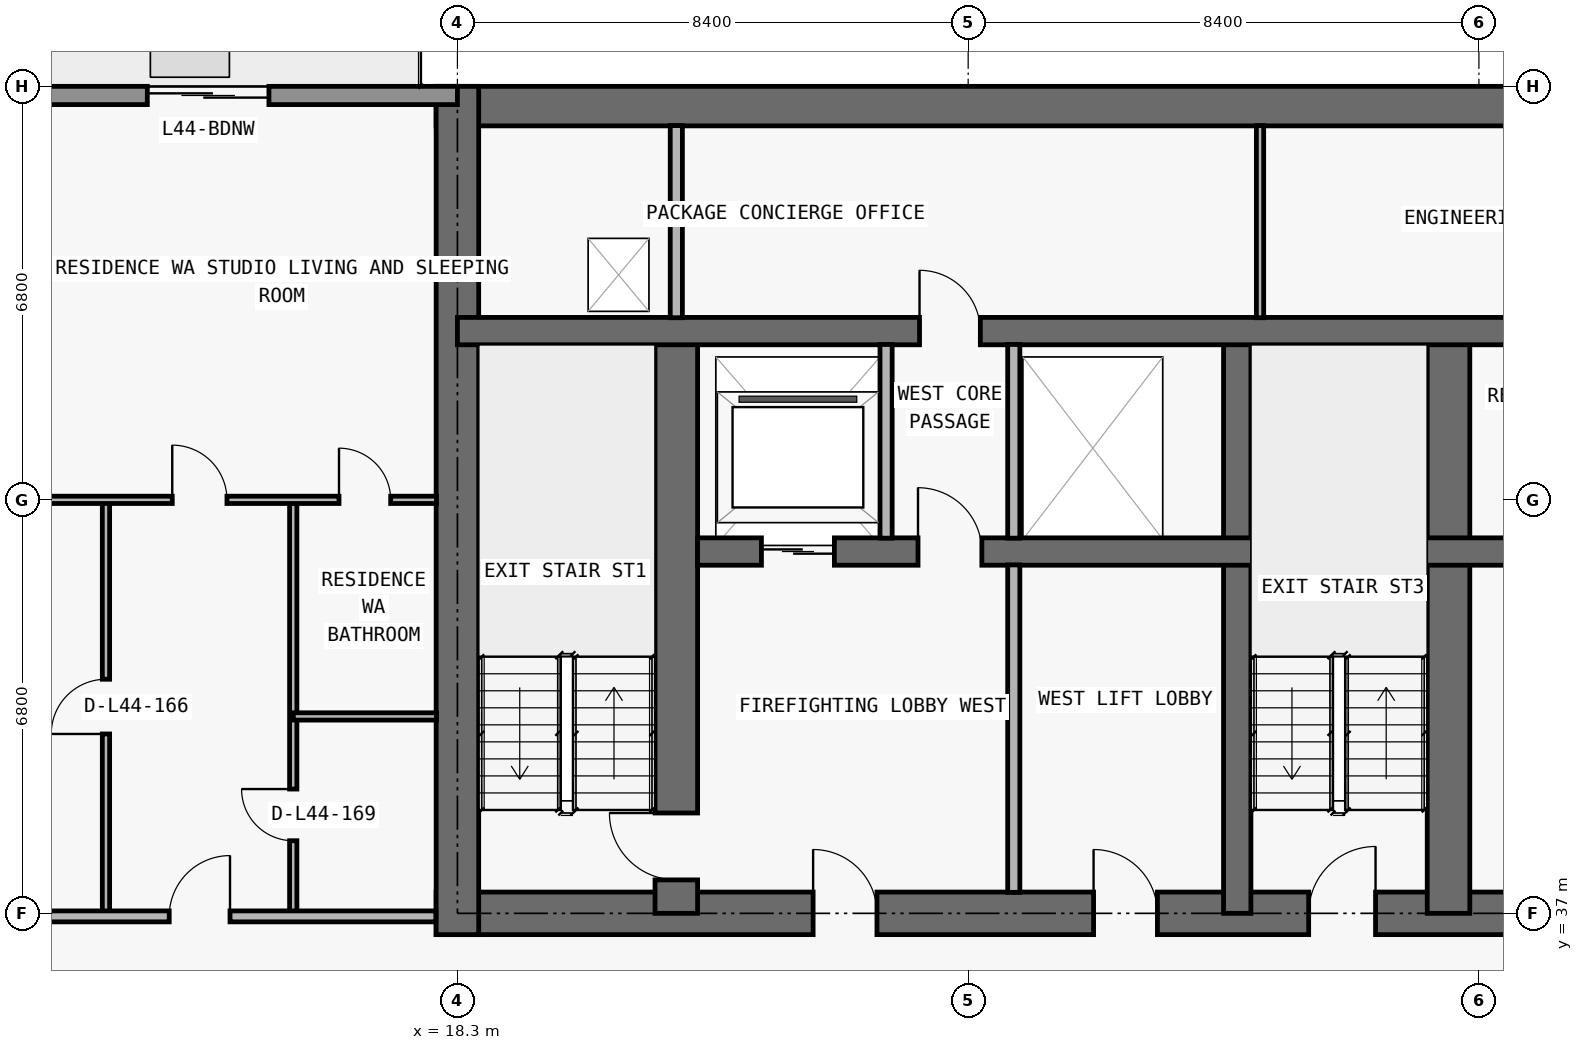
"""IFC4 building model, lengths in metres.
Left out: names, types, materials, properties, quantities, classifications, styles, units other than length and angle.
Written with IfcOpenShell. Run it as: python <this file> out.ifc"""

import sys

from ifc_helpers import new_model, si_unit, direction, frame, frame_2d, origin, place, context, subcontext, project, spatial, rectangle, extrude, element, fill, save


model = new_model("IFC4")
c1 = context("Model", 3, precision=1e-05, world=origin(), true_north=direction((0.0, 1.0)))
c2 = subcontext(c1, "Body", "Model", "MODEL_VIEW")
j1 = project(units=[si_unit("LENGTHUNIT", "METRE"), si_unit("PLANEANGLEUNIT", "RADIAN")], contexts=[c1])
p1 = place(None, origin())
s1 = spatial("IfcSite", under=j1, at=p1, CompositionType="ELEMENT")
p2 = place(p1, origin())
s2 = spatial("IfcBuilding", under=s1, at=p2, CompositionType="ELEMENT")
p3 = place(p2, frame((0.0, 0.0, 160.5)))
s3 = spatial("IfcBuildingStorey", under=s2, at=p3, CompositionType="ELEMENT", Elevation=160.5)
p4 = place(p3, frame((17.95, 37.0, 0.0), z_axis=(0.0, 0.0, 1.0), x_axis=(1.0, 0.0, 0.0)))
e1 = element("IfcWall", 1, at=p4, inside=s3, PredefinedType="SHEAR", context=c2, shape_type="SweptSolid", body=[
    extrude(rectangle(XDim=41.9, YDim=0.7, at=frame_2d((20.95, 0.0))), origin(), (0.0, 0.0, 1.0), 3.05),
])
p5 = place(p4, frame((14.35, 0.0, 0.0)))
e2 = element("IfcOpeningElement", 2, at=p5, cuts=e1, PredefinedType="OPENING", context=c2, shape_type="SweptSolid", body=[
    extrude(rectangle(XDim=1.1, YDim=2.15, at=frame_2d((0.55, 1.075))), frame((0.0, 0.36, 0.0), z_axis=(0.0, -1.0, 0.0), x_axis=(1.0, 0.0, 0.0)), (0.0, 0.0, 1.0), 0.72),
])
p6 = place(p4, frame((6.2, 0.0, 0.0)))
e3 = element("IfcOpeningElement", 3, at=p6, cuts=e1, PredefinedType="OPENING", context=c2, shape_type="SweptSolid", body=[
    extrude(rectangle(XDim=1.05, YDim=2.15, at=frame_2d((0.525, 1.075))), frame((0.0, 0.36, 0.0), z_axis=(0.0, -1.0, 0.0), x_axis=(1.0, 0.0, 0.0)), (0.0, 0.0, 1.0), 0.72),
])
p7 = place(p4, frame((34.7, 0.0, 0.0)))
e4 = element("IfcOpeningElement", 4, at=p7, cuts=e1, PredefinedType="OPENING", context=c2, shape_type="SweptSolid", body=[
    extrude(rectangle(XDim=1.05, YDim=2.15, at=frame_2d((0.525, 1.075))), frame((0.0, 0.36, 0.0), z_axis=(0.0, -1.0, 0.0), x_axis=(1.0, 0.0, 0.0)), (0.0, 0.0, 1.0), 0.72),
])
p8 = place(p4, frame((10.812, 0.0, 0.0)))
e5 = element("IfcOpeningElement", 5, at=p8, cuts=e1, PredefinedType="OPENING", context=c2, shape_type="SweptSolid", body=[
    extrude(rectangle(XDim=1.05, YDim=2.15, at=frame_2d((0.525, 1.075))), frame((0.0, 0.36, 0.0), z_axis=(0.0, -1.0, 0.0), x_axis=(1.0, 0.0, 0.0)), (0.0, 0.0, 1.0), 0.72),
])
p9 = place(p4, frame((24.05, 0.0, 0.0)))
e6 = element("IfcOpeningElement", 6, at=p9, cuts=e1, PredefinedType="OPENING", context=c2, shape_type="SweptSolid", body=[
    extrude(rectangle(XDim=1.05, YDim=2.15, at=frame_2d((0.525, 1.075))), frame((0.0, 0.36, 0.0), z_axis=(0.0, -1.0, 0.0), x_axis=(1.0, 0.0, 0.0)), (0.0, 0.0, 1.0), 0.72),
])
p10 = place(p3, frame((17.95, 50.275, 0.0), z_axis=(0.0, 0.0, 1.0), x_axis=(1.0, 0.0, 0.0)))
e7 = element("IfcWall", 7, at=p10, inside=s3, PredefinedType="SHEAR", context=c2, shape_type="SweptSolid", body=[
    extrude(rectangle(XDim=41.9, YDim=0.65, at=frame_2d((20.95, 0.0))), origin(), (0.0, 0.0, 1.0), 3.05),
])
p11 = place(p3, frame((18.3, 36.65, 0.0), z_axis=(0.0, 0.0, 1.0), x_axis=(0.0, 1.0, 0.0)))
e8 = element("IfcWall", 8, at=p11, inside=s3, PredefinedType="SHEAR", context=c2, shape_type="SweptSolid", body=[
    extrude(rectangle(XDim=13.95, YDim=0.7, at=frame_2d((6.975, 0.0))), origin(), (0.0, 0.0, 1.0), 3.05),
])
p12 = place(p3, frame((21.9, 37.0, 0.0), z_axis=(0.0, 0.0, 1.0), x_axis=(0.0, 1.0, 0.0)))
e9 = element("IfcWall", 9, at=p12, inside=s3, PredefinedType="SHEAR", context=c2, shape_type="SweptSolid", body=[
    extrude(rectangle(XDim=9.575, YDim=0.7, at=frame_2d((4.788, 0.0))), origin(), (0.0, 0.0, 1.0), 3.05),
])
p13 = place(p12, frame((0.55, 0.0, 0.0)))
e10 = element("IfcOpeningElement", 10, at=p13, cuts=e9, PredefinedType="OPENING", context=c2, shape_type="SweptSolid", body=[
    extrude(rectangle(XDim=1.1, YDim=2.15, at=frame_2d((0.55, 1.075))), frame((0.0, 0.36, 0.0), z_axis=(0.0, -1.0, 0.0), x_axis=(1.0, 0.0, 0.0)), (0.0, 0.0, 1.0), 0.72),
])
p14 = place(p3, frame((31.125, 37.0, 0.0), z_axis=(0.0, 0.0, 1.0), x_axis=(0.0, 1.0, 0.0)))
e11 = element("IfcWall", 11, at=p14, inside=s3, PredefinedType="SHEAR", context=c2, shape_type="SweptSolid", body=[
    extrude(rectangle(XDim=9.575, YDim=0.45, at=frame_2d((4.788, 0.0))), origin(), (0.0, 0.0, 1.0), 3.05),
])
p15 = place(p3, frame((34.6, 37.0, 0.0), z_axis=(0.0, 0.0, 1.0), x_axis=(0.0, 1.0, 0.0)))
e12 = element("IfcWall", 12, at=p15, inside=s3, PredefinedType="SHEAR", context=c2, shape_type="SweptSolid", body=[
    extrude(rectangle(XDim=9.575, YDim=0.7, at=frame_2d((4.788, 0.0))), origin(), (0.0, 0.0, 1.0), 3.05),
])
p16 = place(p3, frame((22.25, 42.95, 0.0), z_axis=(0.0, 0.0, 1.0), x_axis=(1.0, 0.0, 0.0)))
e13 = element("IfcWall", 13, at=p16, inside=s3, PredefinedType="SHEAR", context=c2, shape_type="SweptSolid", body=[
    extrude(rectangle(XDim=33.3, YDim=0.45, at=frame_2d((16.65, 0.0))), origin(), (0.0, 0.0, 1.0), 3.05),
])
p17 = place(p16, frame((1.05, 0.0, 0.0)))
e14 = element("IfcOpeningElement", 14, at=p17, cuts=e13, PredefinedType="OPENING", context=c2, shape_type="SweptSolid", body=[
    extrude(rectangle(XDim=1.2, YDim=2.2, at=frame_2d((0.6, 1.1))), frame((0.0, 0.235, 0.0), z_axis=(0.0, -1.0, 0.0), x_axis=(1.0, 0.0, 0.0)), (0.0, 0.0, 1.0), 0.47),
])
p18 = place(p16, frame((31.05, 0.0, 0.0)))
e15 = element("IfcOpeningElement", 15, at=p18, cuts=e13, PredefinedType="OPENING", context=c2, shape_type="SweptSolid", body=[
    extrude(rectangle(XDim=1.2, YDim=2.2, at=frame_2d((0.6, 1.1))), frame((0.0, 0.235, 0.0), z_axis=(0.0, -1.0, 0.0), x_axis=(1.0, 0.0, 0.0)), (0.0, 0.0, 1.0), 0.47),
])
p19 = place(p16, frame((21.4, 0.0, 0.0)))
e16 = element("IfcOpeningElement", 16, at=p19, cuts=e13, PredefinedType="OPENING", context=c2, shape_type="SweptSolid", body=[
    extrude(rectangle(XDim=1.1, YDim=2.2, at=frame_2d((0.55, 1.1))), frame((0.0, 0.235, 0.0), z_axis=(0.0, -1.0, 0.0), x_axis=(1.0, 0.0, 0.0)), (0.0, 0.0, 1.0), 0.47),
])
p20 = place(p16, frame((24.0, 0.0, 0.0)))
e17 = element("IfcOpeningElement", 17, at=p20, cuts=e13, PredefinedType="OPENING", context=c2, shape_type="SweptSolid", body=[
    extrude(rectangle(XDim=1.1, YDim=2.2, at=frame_2d((0.55, 1.1))), frame((0.0, 0.235, 0.0), z_axis=(0.0, -1.0, 0.0), x_axis=(1.0, 0.0, 0.0)), (0.0, 0.0, 1.0), 0.47),
])
p21 = place(p16, frame((3.625, 0.0, 0.0)))
e18 = element("IfcOpeningElement", 18, at=p21, cuts=e13, PredefinedType="OPENING", context=c2, shape_type="SweptSolid", body=[
    extrude(rectangle(XDim=1.05, YDim=2.15, at=frame_2d((0.525, 1.075))), frame((0.0, 0.235, 0.0), z_axis=(0.0, -1.0, 0.0), x_axis=(1.0, 0.0, 0.0)), (0.0, 0.0, 1.0), 0.47),
])
p22 = place(p16, frame((28.675, 0.0, 0.0)))
e19 = element("IfcOpeningElement", 19, at=p22, cuts=e13, PredefinedType="OPENING", context=c2, shape_type="SweptSolid", body=[
    extrude(rectangle(XDim=1.05, YDim=2.15, at=frame_2d((0.525, 1.075))), frame((0.0, 0.235, 0.0), z_axis=(0.0, -1.0, 0.0), x_axis=(1.0, 0.0, 0.0)), (0.0, 0.0, 1.0), 0.47),
])
p23 = place(p16, frame((13.925, 0.0, 0.0)))
e20 = element("IfcOpeningElement", 20, at=p23, cuts=e13, PredefinedType="OPENING", context=c2, shape_type="SweptSolid", body=[
    extrude(rectangle(XDim=1.0, YDim=2.2, at=frame_2d((0.5, 1.1))), frame((0.0, 0.235, 0.0), z_axis=(0.0, -1.0, 0.0), x_axis=(1.0, 0.0, 0.0)), (0.0, 0.0, 1.0), 0.47),
])
p24 = place(p16, frame((18.05, 0.0, 0.0)))
e21 = element("IfcOpeningElement", 21, at=p24, cuts=e13, PredefinedType="OPENING", context=c2, shape_type="SweptSolid", body=[
    extrude(rectangle(XDim=1.0, YDim=2.2, at=frame_2d((0.5, 1.1))), frame((0.0, 0.235, 0.0), z_axis=(0.0, -1.0, 0.0), x_axis=(1.0, 0.0, 0.0)), (0.0, 0.0, 1.0), 0.47),
])
p25 = place(p3, frame((18.3, 46.575, 0.0), z_axis=(0.0, 0.0, 1.0), x_axis=(1.0, 0.0, 0.0)))
e22 = element("IfcWall", 22, at=p25, inside=s3, PredefinedType="SHEAR", context=c2, shape_type="SweptSolid", body=[
    extrude(rectangle(XDim=41.2, YDim=0.45, at=frame_2d((20.6, 0.0))), origin(), (0.0, 0.0, 1.0), 3.05),
])
p26 = place(p25, frame((7.6, 0.0, 0.0)))
e23 = element("IfcOpeningElement", 23, at=p26, cuts=e22, PredefinedType="OPENING", context=c2, shape_type="SweptSolid", body=[
    extrude(rectangle(XDim=1.0, YDim=2.2, at=frame_2d((0.5, 1.1))), frame((0.0, 0.235, 0.0), z_axis=(0.0, -1.0, 0.0), x_axis=(1.0, 0.0, 0.0)), (0.0, 0.0, 1.0), 0.47),
])
p27 = place(p25, frame((32.625, 0.0, 0.0)))
e24 = element("IfcOpeningElement", 24, at=p27, cuts=e22, PredefinedType="OPENING", context=c2, shape_type="SweptSolid", body=[
    extrude(rectangle(XDim=1.05, YDim=2.15, at=frame_2d((0.525, 1.075))), frame((0.0, 0.235, 0.0), z_axis=(0.0, -1.0, 0.0), x_axis=(1.0, 0.0, 0.0)), (0.0, 0.0, 1.0), 0.47),
])
p28 = place(p3, frame((10.1, 50.45, 0.0), z_axis=(0.0, 0.0, 1.0), x_axis=(1.0, 0.0, 0.0)))
e25 = element("IfcWall", 25, at=p28, inside=s3, PredefinedType="STANDARD", context=c2, shape_type="SweptSolid", body=[
    extrude(rectangle(XDim=8.2, YDim=0.3, at=frame_2d((4.1, 0.0))), origin(), (0.0, 0.0, 1.0), 3.05),
])
p29 = place(p28, frame((3.1, 0.0, 0.0)))
e26 = element("IfcOpeningElement", 26, at=p29, cuts=e25, PredefinedType="OPENING", context=c2, shape_type="SweptSolid", body=[
    extrude(rectangle(XDim=2.0, YDim=2.3, at=frame_2d((1.0, 1.15))), frame((0.0, 0.16, 0.0), z_axis=(0.0, -1.0, 0.0), x_axis=(1.0, 0.0, 0.0)), (0.0, 0.0, 1.0), 0.32),
])
p30 = place(p3, frame((12.52, 37.0, 0.0), z_axis=(0.0, 0.0, 1.0), x_axis=(0.0, 1.0, 0.0)))
e27 = element("IfcWall", 27, at=p30, inside=s3, PredefinedType="PARTITIONING", context=c2, shape_type="SweptSolid", body=[
    extrude(rectangle(XDim=6.8, YDim=0.12, at=frame_2d((3.4, 0.0))), origin(), (0.0, 0.0, 1.0), 2.578),
])
p31 = place(p30, frame((2.95, 0.0, 0.0)))
e28 = element("IfcOpeningElement", 28, at=p31, cuts=e27, PredefinedType="OPENING", context=c2, shape_type="SweptSolid", body=[
    extrude(rectangle(XDim=0.9, YDim=2.15, at=frame_2d((0.45, 1.075))), frame((0.0, 0.07, 0.0), z_axis=(0.0, -1.0, 0.0), x_axis=(1.0, 0.0, 0.0)), (0.0, 0.0, 1.0), 0.14),
])
p32 = place(p3, frame((15.6, 37.0, 0.0), z_axis=(0.0, 0.0, 1.0), x_axis=(0.0, 1.0, 0.0)))
e29 = element("IfcWall", 29, at=p32, inside=s3, PredefinedType="PARTITIONING", context=c2, shape_type="SweptSolid", body=[
    extrude(rectangle(XDim=6.8, YDim=0.12, at=frame_2d((3.4, 0.0))), origin(), (0.0, 0.0, 1.0), 2.679),
])
p33 = place(p32, frame((1.194, 0.0, 0.0)))
e30 = element("IfcOpeningElement", 30, at=p33, cuts=e29, PredefinedType="OPENING", context=c2, shape_type="SweptSolid", body=[
    extrude(rectangle(XDim=0.85, YDim=2.1, at=frame_2d((0.425, 1.05))), frame((0.0, 0.07, 0.0), z_axis=(0.0, -1.0, 0.0), x_axis=(1.0, 0.0, 0.0)), (0.0, 0.0, 1.0), 0.14),
])
p34 = place(p3, frame((21.9, 46.795, 0.0), z_axis=(0.0, 0.0, 1.0), x_axis=(0.0, 1.0, 0.0)))
e31 = element("IfcWall", 31, at=p34, inside=s3, PredefinedType="PARTITIONING", context=c2, shape_type="SweptSolid", body=[
    extrude(rectangle(XDim=3.16, YDim=0.2, at=frame_2d((1.58, 0.0))), origin(), (0.0, 0.0, 1.0), 3.05),
])
p35 = place(p3, frame((25.35, 43.17, 0.0), z_axis=(0.0, 0.0, 1.0), x_axis=(0.0, 1.0, 0.0)))
e32 = element("IfcWall", 32, at=p35, inside=s3, PredefinedType="PARTITIONING", context=c2, shape_type="SweptSolid", body=[
    extrude(rectangle(XDim=3.185, YDim=0.2, at=frame_2d((1.593, 0.0))), origin(), (0.0, 0.0, 1.0), 3.05),
])
p36 = place(p3, frame((27.45, 37.345, 0.0), z_axis=(0.0, 0.0, 1.0), x_axis=(0.0, 1.0, 0.0)))
e33 = element("IfcWall", 33, at=p36, inside=s3, PredefinedType="PARTITIONING", context=c2, shape_type="SweptSolid", body=[
    extrude(rectangle(XDim=5.385, YDim=0.2, at=frame_2d((2.692, 0.0))), origin(), (0.0, 0.0, 1.0), 3.05),
])
p37 = place(p3, frame((27.45, 43.17, 0.0), z_axis=(0.0, 0.0, 1.0), x_axis=(0.0, 1.0, 0.0)))
e34 = element("IfcWall", 34, at=p37, inside=s3, PredefinedType="PARTITIONING", context=c2, shape_type="SweptSolid", body=[
    extrude(rectangle(XDim=3.185, YDim=0.2, at=frame_2d((1.593, 0.0))), origin(), (0.0, 0.0, 1.0), 3.05),
])
p38 = place(p3, frame((31.5, 46.795, 0.0), z_axis=(0.0, 0.0, 1.0), x_axis=(0.0, 1.0, 0.0)))
e35 = element("IfcWall", 35, at=p38, inside=s3, PredefinedType="PARTITIONING", context=c2, shape_type="SweptSolid", body=[
    extrude(rectangle(XDim=3.16, YDim=0.12, at=frame_2d((1.58, 0.0))), origin(), (0.0, 0.0, 1.0), 3.05),
])
p39 = place(p3, frame((10.1, 36.95, 0.0), z_axis=(0.0, 0.0, 1.0), x_axis=(1.0, 0.0, 0.0)))
e36 = element("IfcWall", 36, at=p39, inside=s3, PredefinedType="PARTITIONING", context=c2, shape_type="SweptSolid", body=[
    extrude(rectangle(XDim=7.845, YDim=0.18, at=frame_2d((3.922, 0.0))), origin(), (0.0, 0.0, 1.0), 3.05),
])
p40 = place(p39, frame((3.46, 0.0, 0.0)))
e37 = element("IfcOpeningElement", 37, at=p40, cuts=e36, PredefinedType="OPENING", context=c2, shape_type="SweptSolid", body=[
    extrude(rectangle(XDim=1.0, YDim=2.2, at=frame_2d((0.5, 1.1))), frame((0.0, 0.1, 0.0), z_axis=(0.0, -1.0, 0.0), x_axis=(1.0, 0.0, 0.0)), (0.0, 0.0, 1.0), 0.2),
])
p41 = place(p3, frame((15.6, 40.238, 0.0), z_axis=(0.0, 0.0, 1.0), x_axis=(1.0, 0.0, 0.0)))
e38 = element("IfcWall", 38, at=p41, inside=s3, PredefinedType="PARTITIONING", context=c2, shape_type="SweptSolid", body=[
    extrude(rectangle(XDim=2.355, YDim=0.12, at=frame_2d((1.177, 0.0))), origin(), (0.0, 0.0, 1.0), 3.05),
])
p42 = place(p3, frame((6.395, 43.8, 0.0), z_axis=(0.0, 0.0, 1.0), x_axis=(1.0, 0.0, 0.0)))
e39 = element("IfcWall", 39, at=p42, inside=s3, PredefinedType="PARTITIONING", context=c2, shape_type="SweptSolid", body=[
    extrude(rectangle(XDim=11.56, YDim=0.12, at=frame_2d((5.78, 0.0))), origin(), (0.0, 0.0, 1.0), 2.418),
])
p43 = place(p42, frame((7.215, 0.0, 0.0)))
e40 = element("IfcOpeningElement", 40, at=p43, cuts=e39, PredefinedType="OPENING", context=c2, shape_type="SweptSolid", body=[
    extrude(rectangle(XDim=0.9, YDim=2.15, at=frame_2d((0.45, 1.075))), frame((0.0, 0.07, 0.0), z_axis=(0.0, -1.0, 0.0), x_axis=(1.0, 0.0, 0.0)), (0.0, 0.0, 1.0), 0.14),
])
p44 = place(p42, frame((9.958, 0.0, 0.0)))
e41 = element("IfcOpeningElement", 41, at=p44, cuts=e39, PredefinedType="OPENING", context=c2, shape_type="SweptSolid", body=[
    extrude(rectangle(XDim=0.85, YDim=2.1, at=frame_2d((0.425, 1.05))), frame((0.0, 0.07, 0.0), z_axis=(0.0, -1.0, 0.0), x_axis=(1.0, 0.0, 0.0)), (0.0, 0.0, 1.0), 0.14),
])
p45 = place(p29, origin())
e42 = element("IfcDoor", 42, at=p45, inside=s3, OperationType="DOUBLE_DOOR_SLIDING", PredefinedType="DOOR", context=c2, shape_type="SweptSolid", body=[
    extrude(rectangle(XDim=2.0, YDim=2.3, at=frame_2d((1.0, 1.15))), frame((0.0, 0.025, 0.0), z_axis=(0.0, -1.0, 0.0), x_axis=(1.0, 0.0, 0.0)), (0.0, 0.0, 1.0), 0.05),
])
fill(e26, e42)
p46 = place(p17, origin())
e43 = element("IfcDoor", 43, at=p46, inside=s3, OperationType="DOUBLE_DOOR_SLIDING", PredefinedType="DOOR", context=c2, shape_type="SweptSolid", body=[
    extrude(rectangle(XDim=1.2, YDim=2.2, at=frame_2d((0.6, 1.1))), frame((0.0, 0.025, 0.0), z_axis=(0.0, -1.0, 0.0), x_axis=(1.0, 0.0, 0.0)), (0.0, 0.0, 1.0), 0.05),
])
fill(e14, e43)
p47 = place(p5, origin())
e44 = element("IfcDoor", 44, at=p47, inside=s3, OperationType="SINGLE_SWING_RIGHT", PredefinedType="DOOR", context=c2, shape_type="SweptSolid", body=[
    extrude(rectangle(XDim=1.1, YDim=2.15, at=frame_2d((0.55, 1.075))), frame((0.0, 0.025, 0.0), z_axis=(0.0, -1.0, 0.0), x_axis=(1.0, 0.0, 0.0)), (0.0, 0.0, 1.0), 0.05),
])
fill(e2, e44)
p48 = place(p6, origin())
e45 = element("IfcDoor", 45, at=p48, inside=s3, OperationType="SINGLE_SWING_LEFT", PredefinedType="DOOR", context=c2, shape_type="SweptSolid", body=[
    extrude(rectangle(XDim=1.05, YDim=2.15, at=frame_2d((0.525, 1.075))), frame((0.0, 0.025, 0.0), z_axis=(0.0, -1.0, 0.0), x_axis=(1.0, 0.0, 0.0)), (0.0, 0.0, 1.0), 0.05),
])
fill(e3, e45)
p49 = place(p13, origin())
e46 = element("IfcDoor", 46, at=p49, inside=s3, OperationType="SINGLE_SWING_RIGHT", PredefinedType="DOOR", context=c2, shape_type="SweptSolid", body=[
    extrude(rectangle(XDim=1.1, YDim=2.15, at=frame_2d((0.55, 1.075))), frame((0.0, 0.025, 0.0), z_axis=(0.0, -1.0, 0.0), x_axis=(1.0, 0.0, 0.0)), (0.0, 0.0, 1.0), 0.05),
])
fill(e10, e46)
p50 = place(p21, origin())
e47 = element("IfcDoor", 47, at=p50, inside=s3, OperationType="SINGLE_SWING_LEFT", PredefinedType="DOOR", context=c2, shape_type="SweptSolid", body=[
    extrude(rectangle(XDim=1.05, YDim=2.15, at=frame_2d((0.525, 1.075))), frame((0.0, 0.025, 0.0), z_axis=(0.0, -1.0, 0.0), x_axis=(1.0, 0.0, 0.0)), (0.0, 0.0, 1.0), 0.05),
])
fill(e18, e47)
p51 = place(p8, origin())
e48 = element("IfcDoor", 48, at=p51, inside=s3, OperationType="SINGLE_SWING_LEFT", PredefinedType="DOOR", context=c2, shape_type="SweptSolid", body=[
    extrude(rectangle(XDim=1.05, YDim=2.15, at=frame_2d((0.525, 1.075))), frame((0.0, 0.025, 0.0), z_axis=(0.0, -1.0, 0.0), x_axis=(1.0, 0.0, 0.0)), (0.0, 0.0, 1.0), 0.05),
])
fill(e5, e48)
p52 = place(p26, origin())
e49 = element("IfcDoor", 49, at=p52, inside=s3, OperationType="SINGLE_SWING_LEFT", PredefinedType="DOOR", context=c2, shape_type="SweptSolid", body=[
    extrude(rectangle(XDim=1.0, YDim=2.2, at=frame_2d((0.5, 1.1))), frame((0.0, 0.025, 0.0), z_axis=(0.0, -1.0, 0.0), x_axis=(1.0, 0.0, 0.0)), (0.0, 0.0, 1.0), 0.05),
])
fill(e23, e49)
p53 = place(p31, origin())
e50 = element("IfcDoor", 50, at=p53, inside=s3, OperationType="SINGLE_SWING_LEFT", PredefinedType="DOOR", context=c2, shape_type="SweptSolid", body=[
    extrude(rectangle(XDim=0.9, YDim=2.15, at=frame_2d((0.45, 1.075))), frame((0.0, 0.025, 0.0), z_axis=(0.0, -1.0, 0.0), x_axis=(1.0, 0.0, 0.0)), (0.0, 0.0, 1.0), 0.05),
])
fill(e28, e50)
p54 = place(p40, origin())
e51 = element("IfcDoor", 51, at=p54, inside=s3, OperationType="SINGLE_SWING_RIGHT", PredefinedType="DOOR", context=c2, shape_type="SweptSolid", body=[
    extrude(rectangle(XDim=1.0, YDim=2.2, at=frame_2d((0.5, 1.1))), frame((0.0, 0.025, 0.0), z_axis=(0.0, -1.0, 0.0), x_axis=(1.0, 0.0, 0.0)), (0.0, 0.0, 1.0), 0.05),
])
fill(e37, e51)
p55 = place(p43, origin())
e52 = element("IfcDoor", 52, at=p55, inside=s3, OperationType="SINGLE_SWING_LEFT", PredefinedType="DOOR", context=c2, shape_type="SweptSolid", body=[
    extrude(rectangle(XDim=0.9, YDim=2.15, at=frame_2d((0.45, 1.075))), frame((0.0, 0.025, 0.0), z_axis=(0.0, -1.0, 0.0), x_axis=(1.0, 0.0, 0.0)), (0.0, 0.0, 1.0), 0.05),
])
fill(e40, e52)
p56 = place(p33, origin())
e53 = element("IfcDoor", 53, at=p56, inside=s3, OperationType="SINGLE_SWING_RIGHT", PredefinedType="DOOR", context=c2, shape_type="SweptSolid", body=[
    extrude(rectangle(XDim=0.85, YDim=2.1, at=frame_2d((0.425, 1.05))), frame((0.0, 0.025, 0.0), z_axis=(0.0, -1.0, 0.0), x_axis=(1.0, 0.0, 0.0)), (0.0, 0.0, 1.0), 0.05),
])
fill(e30, e53)
p57 = place(p44, origin())
e54 = element("IfcDoor", 54, at=p57, inside=s3, OperationType="SINGLE_SWING_LEFT", PredefinedType="DOOR", context=c2, shape_type="SweptSolid", body=[
    extrude(rectangle(XDim=0.85, YDim=2.1, at=frame_2d((0.425, 1.05))), frame((0.0, 0.025, 0.0), z_axis=(0.0, -1.0, 0.0), x_axis=(1.0, 0.0, 0.0)), (0.0, 0.0, 1.0), 0.05),
])
fill(e41, e54)
save(model, sys.argv[1])
